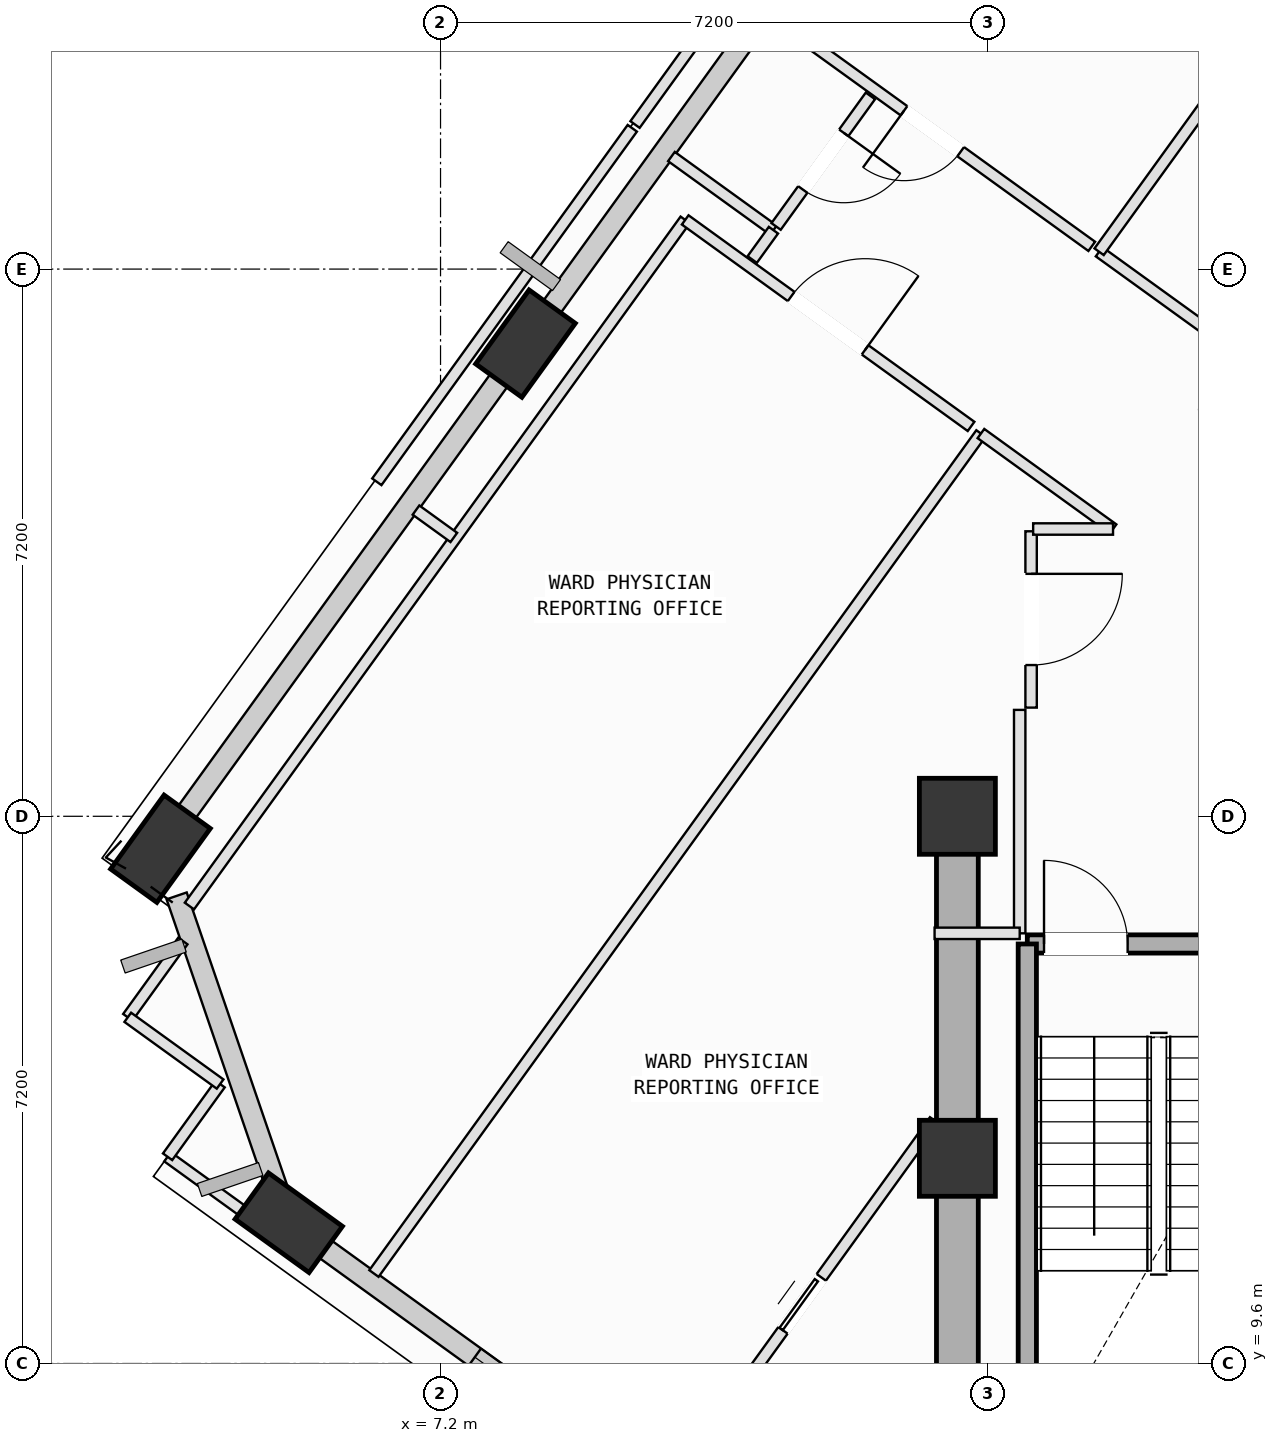
"""IFC4 building model, lengths in metres.
Left out: names, types, materials, properties, quantities, classifications, styles, units other than length and angle.
Written with IfcOpenShell. Run it as: python <this file> out.ifc"""

import sys

from ifc_helpers import new_model, si_unit, direction, frame, frame_2d, origin, origin_2d, place, context, subcontext, project, spatial, rectangle, extrude, element, fill, save


model = new_model("IFC4")
c1 = context("Model", 3, precision=1e-05, world=origin(), true_north=direction((0.0, 1.0)))
c2 = subcontext(c1, "Body", "Model", "MODEL_VIEW")
j1 = project(units=[si_unit("LENGTHUNIT", "METRE"), si_unit("PLANEANGLEUNIT", "RADIAN")], contexts=[c1])
p1 = place(None, origin())
s1 = spatial("IfcSite", under=j1, at=p1, CompositionType="ELEMENT")
p2 = place(p1, origin())
s2 = spatial("IfcBuilding", under=s1, at=p2, CompositionType="ELEMENT")
p3 = place(p2, frame((0.0, 0.0, 255.2)))
s3 = spatial("IfcBuildingStorey", under=s2, at=p3, CompositionType="ELEMENT", Elevation=255.2)
for number, where, z_axis, x_axis in (
    (1, (14.0, 12.3, 0.0), (0.0, 0.0, 1.0), (1.0, 0.0, 0.0)),
    (2, (14.0, 16.8, 0.0), (0.0, 0.0, 1.0), (1.0, 0.0, 0.0)),
):
    element("IfcColumn", number, at=place(p3, frame(where, z_axis=z_axis, x_axis=x_axis)), inside=s3, PredefinedType="COLUMN", context=c2, shape_type="SweptSolid", body=[
        extrude(rectangle(XDim=1.0, YDim=1.0, at=origin_2d()), origin(), (0.0, 0.0, 1.0), 4.0),
    ])
p4 = place(p3, frame((8.318, 23.02, 0.002), z_axis=(0.008202176681, -0.10413726542, 0.994529111816), x_axis=(0.520560631231, 0.849616141392, 0.084670192506)))
e3 = element("IfcColumn", 3, at=p4, inside=s3, PredefinedType="COLUMN", context=c2, shape_type="SweptSolid", body=[
    extrude(rectangle(XDim=1.2, YDim=0.75, at=origin_2d()), origin(), (0.0, 0.0, 1.0), 4.018),
])
p5 = place(p3, frame((3.515, 16.373, 0.002), z_axis=(0.035623982512, -0.123411653703, 0.991715934933), x_axis=(0.339757548068, 0.934732419667, 0.104115859283)))
e4 = element("IfcColumn", 4, at=p5, inside=s3, PredefinedType="COLUMN", context=c2, shape_type="SweptSolid", body=[
    extrude(rectangle(XDim=1.2, YDim=0.75, at=origin_2d()), origin(), (0.0, 0.0, 1.0), 4.03),
])
p6 = place(p3, frame((5.203, 11.452, 0.002), z_axis=(0.055855526664, -0.116254615693, 0.991647631203), x_axis=(-0.98211534436, 0.172463303398, 0.075537138904)))
e5 = element("IfcColumn", 5, at=p6, inside=s3, PredefinedType="COLUMN", context=c2, shape_type="SweptSolid", body=[
    extrude(rectangle(XDim=1.2, YDim=0.75, at=origin_2d()), origin(), (0.0, 0.0, 1.0), 4.03),
])
p7 = place(p3, frame((8.443, 23.193, 0.0), z_axis=(0.0, 0.0, 1.0), x_axis=(0.585665597158, 0.810552779469, 0.0)))
e6 = element("IfcWall", 6, at=p7, inside=s3, PredefinedType="SOLIDWALL", context=c2, shape_type="SweptSolid", body=[
    extrude(rectangle(XDim=7.434, YDim=0.28, at=frame_2d((3.717, 0.0))), origin(), (0.0, 0.0, 1.0), 3.265),
])
p8 = place(p3, frame((3.622, 16.521, 0.0), z_axis=(0.0, 0.0, 1.0), x_axis=(0.585672755105, 0.810547607441, 0.0)))
e7 = element("IfcWall", 7, at=p8, inside=s3, PredefinedType="SOLIDWALL", context=c2, shape_type="SweptSolid", body=[
    extrude(rectangle(XDim=7.485, YDim=0.28, at=frame_2d((3.742, 0.0))), origin(), (0.0, 0.0, 1.0), 3.265),
])
p9 = place(p3, frame((5.158, 11.583, 0.0), z_axis=(0.0, 0.0, 1.0), x_axis=(-0.324440430391, 0.945906130188, 0.0)))
e8 = element("IfcWall", 8, at=p9, inside=s3, PredefinedType="SOLIDWALL", context=c2, shape_type="SweptSolid", body=[
    extrude(rectangle(XDim=4.408, YDim=0.28, at=frame_2d((2.204, 0.0))), origin(), (0.0, 0.0, 1.0), 3.265),
])
p10 = place(p3, frame((10.42, 7.683, 0.0), z_axis=(0.0, 0.0, 1.0), x_axis=(-0.810541185411, 0.585681642834, 0.0)))
e9 = element("IfcWall", 9, at=p10, inside=s3, PredefinedType="SOLIDWALL", context=c2, shape_type="SweptSolid", body=[
    extrude(rectangle(XDim=5.831, YDim=0.28, at=frame_2d((2.915, 0.0))), origin(), (0.0, 0.0, 1.0), 3.265),
])
p11 = place(p10, frame((2.217, 0.0, 0.75)))
e10 = element("IfcOpeningElement", 10, at=p11, cuts=e9, PredefinedType="OPENING", context=c2, shape_type="SweptSolid", body=[
    extrude(rectangle(XDim=1.2, YDim=1.75, at=frame_2d((0.6, 0.875))), frame((0.0, 0.15, 0.0), z_axis=(0.0, -1.0, 0.0), x_axis=(1.0, 0.0, 0.0)), (0.0, 0.0, 1.0), 0.3),
])
p12 = place(p3, frame((14.92, 15.12, 0.0), z_axis=(0.0, 0.0, 1.0), x_axis=(1.0, 0.0, 0.0)))
e11 = element("IfcWall", 11, at=p12, inside=s3, PredefinedType="SOLIDWALL", context=c2, shape_type="SweptSolid", body=[
    extrude(rectangle(XDim=3.46, YDim=0.24, at=frame_2d((1.73, 0.0))), origin(), (0.0, 0.0, 1.0), 3.78),
])
p13 = place(p12, frame((0.22, 0.0, 0.0)))
e12 = element("IfcOpeningElement", 12, at=p13, cuts=e11, PredefinedType="OPENING", context=c2, shape_type="SweptSolid", body=[
    extrude(rectangle(XDim=1.1, YDim=2.15, at=frame_2d((0.55, 1.075))), frame((0.0, 0.13, 0.0), z_axis=(0.0, -1.0, 0.0), x_axis=(1.0, 0.0, 0.0)), (0.0, 0.0, 1.0), 0.26),
])
p14 = place(p3, frame((14.92, 8.075, 0.0), z_axis=(0.0, 0.0, 1.0), x_axis=(0.0, 1.0, 0.0)))
e13 = element("IfcWall", 13, at=p14, inside=s3, PredefinedType="SOLIDWALL", context=c2, shape_type="SweptSolid", body=[
    extrude(rectangle(XDim=7.045, YDim=0.24, at=frame_2d((3.522, 0.0))), origin(), (0.0, 0.0, 1.0), 3.78),
])
p15 = place(p3, frame((14.0, 16.8, 0.0), z_axis=(0.0, 0.0, 1.0), x_axis=(0.0, -1.0, 0.0)))
e14 = element("IfcWall", 14, at=p15, inside=s3, PredefinedType="SHEAR", context=c2, shape_type="SweptSolid", body=[
    extrude(rectangle(XDim=9.0, YDim=0.55, at=frame_2d((4.5, 0.0))), origin(), (0.0, 0.0, 1.0), 3.78),
])
p16 = place(p3, frame((10.215, 7.973, 0.0), z_axis=(0.0, 0.0, 1.0), x_axis=(0.585568437411, 0.810622973465, 0.0)))
e15 = element("IfcWall", 15, at=p16, inside=s3, PredefinedType="PARTITIONING", context=c2, shape_type="SweptSolid", body=[
    extrude(rectangle(XDim=5.951, YDim=0.15, at=frame_2d((2.976, 0.0))), origin(), (0.0, 0.0, 1.0), 3.78),
])
p17 = place(p16, frame((2.546, 0.0, 0.0)))
e16 = element("IfcOpeningElement", 16, at=p17, cuts=e15, PredefinedType="OPENING", context=c2, shape_type="SweptSolid", body=[
    extrude(rectangle(XDim=0.86, YDim=2.06, at=frame_2d((0.43, 1.03))), frame((0.0, 0.085, 0.0), z_axis=(0.0, -1.0, 0.0), x_axis=(1.0, 0.0, 0.0)), (0.0, 0.0, 1.0), 0.17),
])
p18 = place(p3, frame((14.97, 20.55, 0.0), z_axis=(0.0, 0.0, 1.0), x_axis=(0.0, -1.0, 0.0)))
e17 = element("IfcWall", 17, at=p18, inside=s3, PredefinedType="PARTITIONING", context=c2, shape_type="SweptSolid", body=[
    extrude(rectangle(XDim=2.32, YDim=0.15, at=frame_2d((1.16, 0.0))), origin(), (0.0, 0.0, 1.0), 3.78),
])
p19 = place(p18, frame((0.56, 0.0, 0.0)))
e18 = element("IfcOpeningElement", 18, at=p19, cuts=e17, PredefinedType="OPENING", context=c2, shape_type="SweptSolid", body=[
    extrude(rectangle(XDim=1.2, YDim=2.15, at=frame_2d((0.6, 1.075))), frame((0.0, 0.085, 0.0), z_axis=(0.0, -1.0, 0.0), x_axis=(1.0, 0.0, 0.0)), (0.0, 0.0, 1.0), 0.17),
])
p20 = place(p3, frame((14.82, 18.2, 0.0), z_axis=(0.0, 0.0, 1.0), x_axis=(0.0, -1.0, 0.0)))
e19 = element("IfcWall", 19, at=p20, inside=s3, PredefinedType="PARTITIONING", context=c2, shape_type="SweptSolid", body=[
    extrude(rectangle(XDim=2.94, YDim=0.15, at=frame_2d((1.47, 0.0))), origin(), (0.0, 0.0, 1.0), 3.78),
])
p21 = place(p3, frame((14.82, 15.26, 0.0), z_axis=(0.0, 0.0, 1.0), x_axis=(-1.0, 0.0, 0.0)))
e20 = element("IfcWall", 20, at=p21, inside=s3, PredefinedType="PARTITIONING", context=c2, shape_type="SweptSolid", body=[
    extrude(rectangle(XDim=1.12, YDim=0.15, at=frame_2d((0.56, 0.0))), origin(), (0.0, 0.0, 1.0), 3.78),
])
p22 = place(p3, frame((6.324, 10.784, 0.0), z_axis=(0.0, 0.0, 1.0), x_axis=(0.585687308948, 0.810537091155, 0.0)))
e21 = element("IfcWall", 21, at=p22, inside=s3, PredefinedType="PARTITIONING", context=c2, shape_type="SweptSolid", body=[
    extrude(rectangle(XDim=13.635, YDim=0.15, at=frame_2d((6.818, 0.0))), origin(), (0.0, 0.0, 1.0), 3.78),
])
p23 = place(p3, frame((14.31, 21.836, 0.0), z_axis=(0.0, 0.0, 1.0), x_axis=(0.810544103315, -0.585677604643, 0.0)))
e22 = element("IfcWall", 22, at=p23, inside=s3, PredefinedType="PARTITIONING", context=c2, shape_type="SweptSolid", body=[
    extrude(rectangle(XDim=2.144, YDim=0.15, at=frame_2d((1.072, 0.0))), origin(), (0.0, 0.0, 1.0), 3.78),
])
p24 = place(p3, frame((16.048, 20.58, 0.0), z_axis=(0.0, 0.0, 1.0), x_axis=(-1.0, 0.0, 0.0)))
e23 = element("IfcWall", 23, at=p24, inside=s3, PredefinedType="PARTITIONING", context=c2, shape_type="SweptSolid", body=[
    extrude(rectangle(XDim=1.051, YDim=0.15, at=frame_2d((0.525, 0.0))), origin(), (0.0, 0.0, 1.0), 3.78),
])
p25 = place(p3, frame((3.085, 14.155, 0.0), z_axis=(0.0, 0.0, 1.0), x_axis=(0.585519345378, 0.810658433736, 0.0)))
e24 = element("IfcWall", 24, at=p25, inside=s3, PredefinedType="PARTITIONING", context=c2, shape_type="SweptSolid", body=[
    extrude(rectangle(XDim=1.238, YDim=0.15, at=frame_2d((0.619, 0.0))), origin(), (0.0, 0.0, 1.0), 3.78),
])
p26 = place(p3, frame((3.896, 15.619, 0.0), z_axis=(0.0, 0.0, 1.0), x_axis=(0.585648203919, 0.810565346685, 0.0)))
e25 = element("IfcWall", 25, at=p26, inside=s3, PredefinedType="PARTITIONING", context=c2, shape_type="SweptSolid", body=[
    extrude(rectangle(XDim=11.138, YDim=0.15, at=frame_2d((5.569, 0.0))), origin(), (0.0, 0.0, 1.0), 3.265),
])
p27 = place(p3, frame((10.419, 24.647, 0.0), z_axis=(0.0, 0.0, 1.0), x_axis=(0.810600131972, -0.585600056392, 0.0)))
e26 = element("IfcWall", 26, at=p27, inside=s3, PredefinedType="PARTITIONING", context=c2, shape_type="SweptSolid", body=[
    extrude(rectangle(XDim=4.64, YDim=0.15, at=frame_2d((2.32, 0.0))), origin(), (0.0, 0.0, 1.0), 3.78),
])
p28 = place(p27, frame((1.72, 0.0, 0.0)))
e27 = element("IfcOpeningElement", 27, at=p28, cuts=e26, PredefinedType="OPENING", context=c2, shape_type="SweptSolid", body=[
    extrude(rectangle(XDim=1.2, YDim=2.15, at=frame_2d((0.6, 1.075))), frame((0.0, 0.085, 0.0), z_axis=(0.0, -1.0, 0.0), x_axis=(1.0, 0.0, 0.0)), (0.0, 0.0, 1.0), 0.17),
])
p29 = place(p3, frame((5.559, 10.911, 0.0), z_axis=(0.0, 0.0, 1.0), x_axis=(-0.810540070568, 0.585683185693, 0.0)))
e28 = element("IfcWall", 28, at=p29, inside=s3, PredefinedType="PARTITIONING", context=c2, shape_type="SweptSolid", body=[
    extrude(rectangle(XDim=2.406, YDim=0.15, at=frame_2d((1.203, 0.0))), origin(), (0.0, 0.0, 1.0), 3.265),
])
p30 = place(p3, frame((3.609, 12.32, 0.0), z_axis=(0.0, 0.0, 1.0), x_axis=(0.585475452093, 0.810690135006, 0.0)))
e29 = element("IfcWall", 29, at=p30, inside=s3, PredefinedType="PARTITIONING", context=c2, shape_type="SweptSolid", body=[
    extrude(rectangle(XDim=1.18, YDim=0.15, at=frame_2d((0.59, 0.0))), origin(), (0.0, 0.0, 1.0), 3.78),
])
p31 = place(p3, frame((4.3, 13.277, 0.0), z_axis=(0.0, 0.0, 1.0), x_axis=(-0.810563260174, 0.585651091739, 0.0)))
e30 = element("IfcWall", 30, at=p31, inside=s3, PredefinedType="PARTITIONING", context=c2, shape_type="SweptSolid", body=[
    extrude(rectangle(XDim=1.499, YDim=0.15, at=frame_2d((0.75, 0.0))), origin(), (0.0, 0.0, 1.0), 3.78),
])
p32 = place(p3, frame((20.307, 21.019, 0.0), z_axis=(0.0, 0.0, 1.0), x_axis=(-0.810596982644, 0.585604415735, 0.0)))
e31 = element("IfcWall", 31, at=p32, inside=s3, PredefinedType="PARTITIONING", context=c2, shape_type="SweptSolid", body=[
    extrude(rectangle(XDim=5.48, YDim=0.15, at=frame_2d((2.74, 0.0))), origin(), (0.0, 0.0, 1.0), 3.415),
])
p33 = place(p32, frame((2.28, 0.0, 0.0)))
e32 = element("IfcOpeningElement", 32, at=p33, cuts=e31, PredefinedType="OPENING", context=c2, shape_type="SweptSolid", body=[
    extrude(rectangle(XDim=0.92, YDim=2.1, at=frame_2d((0.46, 1.05))), frame((0.0, 0.085, 0.0), z_axis=(0.0, -1.0, 0.0), x_axis=(1.0, 0.0, 0.0)), (0.0, 0.0, 1.0), 0.17),
])
p34 = place(p3, frame((15.865, 24.228, 0.0), z_axis=(0.0, 0.0, 1.0), x_axis=(0.585696470698, 0.810530470872, 0.0)))
e33 = element("IfcWall", 33, at=p34, inside=s3, PredefinedType="PARTITIONING", context=c2, shape_type="SweptSolid", body=[
    extrude(rectangle(XDim=4.069, YDim=0.15, at=frame_2d((2.034, 0.0))), origin(), (0.0, 0.0, 1.0), 3.78),
])
p35 = place(p3, frame((15.768, 24.299, 0.0), z_axis=(0.0, 0.0, 1.0), x_axis=(-0.810655591008, 0.58552328115, 0.0)))
e34 = element("IfcWall", 34, at=p35, inside=s3, PredefinedType="PARTITIONING", context=c2, shape_type="SweptSolid", body=[
    extrude(rectangle(XDim=5.175, YDim=0.15, at=frame_2d((2.587, 0.0))), origin(), (0.0, 0.0, 1.0), 3.78),
])
p36 = place(p35, frame((2.127, 0.0, 0.0)))
e35 = element("IfcOpeningElement", 35, at=p36, cuts=e34, PredefinedType="OPENING", context=c2, shape_type="SweptSolid", body=[
    extrude(rectangle(XDim=0.92, YDim=2.1, at=frame_2d((0.46, 1.05))), frame((0.0, 0.085, 0.0), z_axis=(0.0, -1.0, 0.0), x_axis=(1.0, 0.0, 0.0)), (0.0, 0.0, 1.0), 0.17),
])
p37 = place(p3, frame((7.375, 20.469, 0.0), z_axis=(0.0, 0.0, 1.0), x_axis=(-0.810364866816, 0.585925577723, 0.0)))
e36 = element("IfcWall", 36, at=p37, inside=s3, PredefinedType="PARTITIONING", context=c2, shape_type="SweptSolid", body=[
    extrude(rectangle(XDim=0.615, YDim=0.15, at=frame_2d((0.307, 0.0))), origin(), (0.0, 0.0, 1.0), 3.78),
])
p38 = place(p3, frame((6.362, 21.201, 0.0), z_axis=(0.0, 0.0, 1.0), x_axis=(0.585603930262, 0.810597333367, 0.0)))
e37 = element("IfcWall", 37, at=p38, inside=s3, PredefinedType="PARTITIONING", context=c2, shape_type="SweptSolid", body=[
    extrude(rectangle(XDim=5.739, YDim=0.15, at=frame_2d((2.87, 0.0))), origin(), (0.0, 0.0, 1.0), 3.78),
])
p39 = place(p3, frame((10.238, 25.481, 0.0), z_axis=(0.0, 0.0, 1.0), x_axis=(0.810753116581, -0.585388233529, 0.0)))
e38 = element("IfcWall", 38, at=p39, inside=s3, PredefinedType="PARTITIONING", context=c2, shape_type="SweptSolid", body=[
    extrude(rectangle(XDim=1.655, YDim=0.15, at=frame_2d((0.828, 0.0))), origin(), (0.0, 0.0, 1.0), 3.78),
])
p40 = place(p3, frame((11.58, 24.512, 0.0), z_axis=(0.0, 0.0, 1.0), x_axis=(-0.585883500757, -0.810395288449, 0.0)))
e39 = element("IfcWall", 39, at=p40, inside=s3, PredefinedType="PARTITIONING", context=c2, shape_type="SweptSolid", body=[
    extrude(rectangle(XDim=0.476, YDim=0.15, at=frame_2d((0.238, 0.0))), origin(), (0.0, 0.0, 1.0), 3.78),
])
p41 = place(p3, frame((12.856, 26.279, 0.0), z_axis=(0.0, 0.0, 1.0), x_axis=(-0.585545230092, -0.810639737193, 0.0)))
e40 = element("IfcWall", 40, at=p41, inside=s3, PredefinedType="PARTITIONING", context=c2, shape_type="SweptSolid", body=[
    extrude(rectangle(XDim=2.119, YDim=0.15, at=frame_2d((1.06, 0.0))), origin(), (0.0, 0.0, 1.0), 3.78),
])
p42 = place(p41, frame((0.6, 0.0, 0.0)))
e41 = element("IfcOpeningElement", 41, at=p42, cuts=e40, PredefinedType="OPENING", context=c2, shape_type="SweptSolid", body=[
    extrude(rectangle(XDim=0.92, YDim=2.1, at=frame_2d((0.46, 1.05))), frame((0.0, 0.085, 0.0), z_axis=(0.0, -1.0, 0.0), x_axis=(1.0, 0.0, 0.0)), (0.0, 0.0, 1.0), 0.17),
])
p43 = place(p3, frame((9.759, 25.902, 0.0), z_axis=(0.0, 0.0, 1.0), x_axis=(0.58563297503, 0.810576349617, 0.0)))
e42 = element("IfcWall", 42, at=p43, inside=s3, PredefinedType="PARTITIONING", context=c2, shape_type="SweptSolid", body=[
    extrude(rectangle(XDim=5.57, YDim=0.15, at=frame_2d((2.785, 0.0))), origin(), (0.0, 0.0, 1.0), 3.78),
])
p44 = place(p11, origin())
e43 = element("IfcWindow", 43, at=p44, inside=s3, PartitioningType="SINGLE_PANEL", PredefinedType="WINDOW", context=c2, shape_type="SweptSolid", body=[
    extrude(rectangle(XDim=1.2, YDim=1.75, at=frame_2d((0.6, 0.875))), frame((0.0, 0.03, 0.0), z_axis=(0.0, -1.0, 0.0), x_axis=(1.0, 0.0, 0.0)), (0.0, 0.0, 1.0), 0.06),
])
fill(e10, e43)
p45 = place(p13, origin())
e44 = element("IfcDoor", 44, at=p45, inside=s3, OperationType="SINGLE_SWING_LEFT", PredefinedType="DOOR", context=c2, shape_type="SweptSolid", body=[
    extrude(rectangle(XDim=1.1, YDim=2.15, at=frame_2d((0.55, 1.075))), frame((0.0, 0.025, 0.0), z_axis=(0.0, -1.0, 0.0), x_axis=(1.0, 0.0, 0.0)), (0.0, 0.0, 1.0), 0.05),
])
fill(e12, e44)
p46 = place(p19, origin())
e45 = element("IfcDoor", 45, at=p46, inside=s3, OperationType="SINGLE_SWING_LEFT", PredefinedType="DOOR", context=c2, shape_type="SweptSolid", body=[
    extrude(rectangle(XDim=1.2, YDim=2.15, at=frame_2d((0.6, 1.075))), frame((0.0, 0.025, 0.0), z_axis=(0.0, -1.0, 0.0), x_axis=(1.0, 0.0, 0.0)), (0.0, 0.0, 1.0), 0.05),
])
fill(e18, e45)
p47 = place(p28, origin())
e46 = element("IfcDoor", 46, at=p47, inside=s3, OperationType="SINGLE_SWING_RIGHT", PredefinedType="DOOR", context=c2, shape_type="SweptSolid", body=[
    extrude(rectangle(XDim=1.2, YDim=2.15, at=frame_2d((0.6, 1.075))), frame((0.0, 0.025, 0.0), z_axis=(0.0, -1.0, 0.0), x_axis=(1.0, 0.0, 0.0)), (0.0, 0.0, 1.0), 0.05),
])
fill(e27, e46)
p48 = place(p36, origin())
e47 = element("IfcDoor", 47, at=p48, inside=s3, OperationType="SINGLE_SWING_RIGHT", PredefinedType="DOOR", context=c2, shape_type="SweptSolid", body=[
    extrude(rectangle(XDim=0.92, YDim=2.1, at=frame_2d((0.46, 1.05))), frame((0.0, 0.025, 0.0), z_axis=(0.0, -1.0, 0.0), x_axis=(1.0, 0.0, 0.0)), (0.0, 0.0, 1.0), 0.05),
])
fill(e35, e47)
p49 = place(p42, origin())
e48 = element("IfcDoor", 48, at=p49, inside=s3, OperationType="SINGLE_SWING_LEFT", PredefinedType="DOOR", context=c2, shape_type="SweptSolid", body=[
    extrude(rectangle(XDim=0.92, YDim=2.1, at=frame_2d((0.46, 1.05))), frame((0.0, 0.025, 0.0), z_axis=(0.0, -1.0, 0.0), x_axis=(1.0, 0.0, 0.0)), (0.0, 0.0, 1.0), 0.05),
])
fill(e41, e48)
p50 = place(p17, origin())
e49 = element("IfcDoor", 49, at=p50, inside=s3, OperationType="SLIDING_TO_LEFT", PredefinedType="DOOR", context=c2, shape_type="SweptSolid", body=[
    extrude(rectangle(XDim=0.86, YDim=2.06, at=frame_2d((0.43, 1.03))), frame((0.0, 0.025, 0.0), z_axis=(0.0, -1.0, 0.0), x_axis=(1.0, 0.0, 0.0)), (0.0, 0.0, 1.0), 0.05),
])
fill(e16, e49)
save(model, sys.argv[1])
